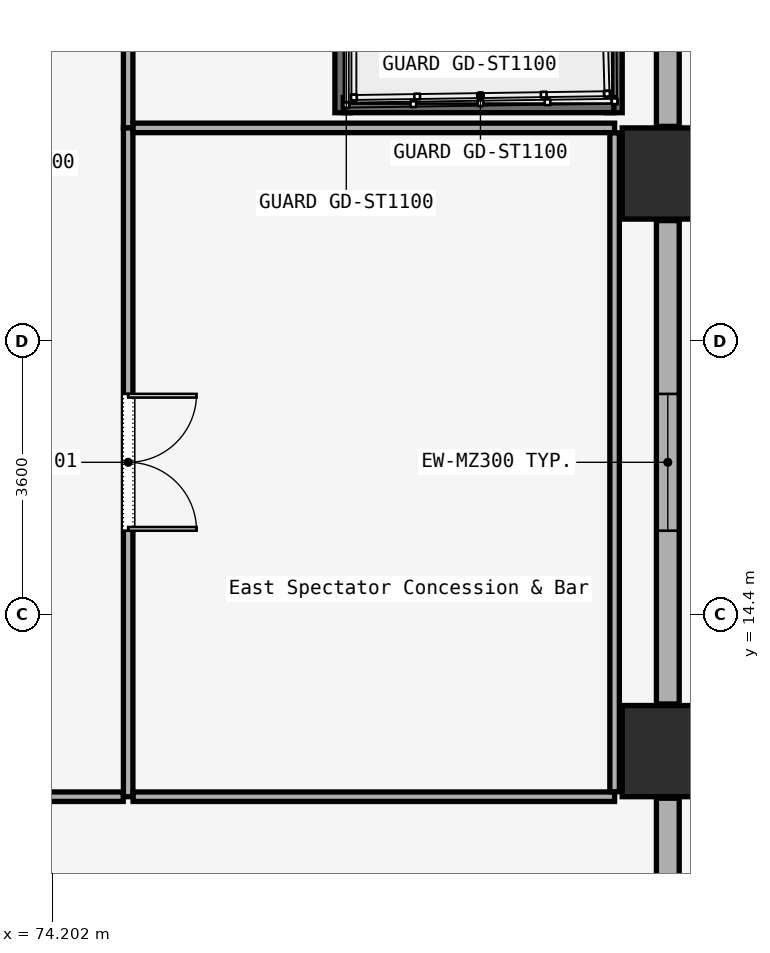
"""IFC4 building model, lengths in metres.
Left out: names, types, materials, properties, quantities, classifications, styles, units other than length and angle.
Written with IfcOpenShell. Run it as: python <this file> out.ifc"""

import sys

from ifc_helpers import new_model, si_unit, direction, frame, frame_2d, origin, origin_2d, place, context, subcontext, project, spatial, rectangle, extrude, element, fill, save


model = new_model("IFC4")
c1 = context("Model", 3, precision=1e-05, world=origin(), true_north=direction((0.0, 1.0)))
c2 = subcontext(c1, "Body", "Model", "MODEL_VIEW")
j1 = project(units=[si_unit("LENGTHUNIT", "METRE"), si_unit("PLANEANGLEUNIT", "RADIAN")], contexts=[c1])
p1 = place(None, origin())
s1 = spatial("IfcSite", under=j1, at=p1, CompositionType="ELEMENT")
p2 = place(p1, origin())
s2 = spatial("IfcBuilding", under=s1, at=p2, CompositionType="ELEMENT")
p3 = place(p2, frame((0.0, 0.0, 6.0)))
s3 = spatial("IfcBuildingStorey", under=s2, at=p3, CompositionType="ELEMENT", Elevation=6.0)
for number, where, z_axis, x_axis in (
    (1, (82.3, 12.6, 0.0), (0.0, 0.0, 1.0), (1.0, 0.0, 0.0)),
    (2, (82.3, 20.2, 0.0), (0.0, 0.0, 1.0), (1.0, 0.0, 0.0)),
):
    element("IfcColumn", number, at=place(p3, frame(where, z_axis=z_axis, x_axis=x_axis)), inside=s3, PredefinedType="COLUMN", context=c2, shape_type="SweptSolid", body=[
        extrude(rectangle(XDim=1.2, YDim=1.2, at=origin_2d()), origin(), (0.0, 0.0, 1.0), 5.7),
    ])
p4 = place(p3, frame((82.3, 11.98, 0.0), z_axis=(0.0, 0.0, 1.0), x_axis=(0.0, -1.0, 0.0)))
e3 = element("IfcWall", 3, at=p4, inside=s3, PredefinedType="SOLIDWALL", context=c2, shape_type="SweptSolid", body=[
    extrude(rectangle(XDim=6.36, YDim=0.3, at=frame_2d((3.18, 0.0))), origin(), (0.0, 0.0, 1.0), 5.7),
])
p5 = place(p4, frame((2.28, 0.0, 1.0)))
e4 = element("IfcOpeningElement", 4, at=p5, cuts=e3, PredefinedType="OPENING", context=c2, shape_type="SweptSolid", body=[
    extrude(rectangle(XDim=1.8, YDim=2.2, at=frame_2d((0.9, 1.1))), frame((0.0, 0.15, 0.0), z_axis=(0.0, -1.0, 0.0), x_axis=(1.0, 0.0, 0.0)), (0.0, 0.0, 1.0), 0.3),
])
p6 = place(p3, frame((82.3, 19.58, 0.0), z_axis=(0.0, 0.0, 1.0), x_axis=(0.0, -1.0, 0.0)))
e5 = element("IfcWall", 5, at=p6, inside=s3, PredefinedType="SOLIDWALL", context=c2, shape_type="SweptSolid", body=[
    extrude(rectangle(XDim=6.36, YDim=0.3, at=frame_2d((3.18, 0.0))), origin(), (0.0, 0.0, 1.0), 5.7),
])
p7 = place(p6, frame((2.28, 0.0, 1.0)))
e6 = element("IfcOpeningElement", 6, at=p7, cuts=e5, PredefinedType="OPENING", context=c2, shape_type="SweptSolid", body=[
    extrude(rectangle(XDim=1.8, YDim=2.2, at=frame_2d((0.9, 1.1))), frame((0.0, 0.15, 0.0), z_axis=(0.0, -1.0, 0.0), x_axis=(1.0, 0.0, 0.0)), (0.0, 0.0, 1.0), 0.3),
])
p8 = place(p3, frame((82.3, 27.18, 0.0), z_axis=(0.0, 0.0, 1.0), x_axis=(0.0, -1.0, 0.0)))
e7 = element("IfcWall", 7, at=p8, inside=s3, PredefinedType="SOLIDWALL", context=c2, shape_type="SweptSolid", body=[
    extrude(rectangle(XDim=6.36, YDim=0.3, at=frame_2d((3.18, 0.0))), origin(), (0.0, 0.0, 1.0), 5.7),
])
p9 = place(p8, frame((2.28, 0.0, 1.0)))
e8 = element("IfcOpeningElement", 8, at=p9, cuts=e7, PredefinedType="OPENING", context=c2, shape_type="SweptSolid", body=[
    extrude(rectangle(XDim=1.8, YDim=2.2, at=frame_2d((0.9, 1.1))), frame((0.0, 0.15, 0.0), z_axis=(0.0, -1.0, 0.0), x_axis=(1.0, 0.0, 0.0)), (0.0, 0.0, 1.0), 0.3),
])
for number, where, z_axis, x_axis in (
    (9, (78.02, 28.95, 0.0), (0.0, 0.0, 1.0), (0.0, -1.0, 0.0)),
    (10, (81.6, 28.95, 0.0), (0.0, 0.0, 1.0), (0.0, -1.0, 0.0)),
):
    element("IfcWall", number, at=place(p3, frame(where, z_axis=z_axis, x_axis=x_axis)), inside=s3, PredefinedType="SOLIDWALL", context=c2, shape_type="SweptSolid", body=[
        extrude(rectangle(XDim=7.95, YDim=0.2, at=frame_2d((3.975, 0.0))), origin(), (0.0, 0.0, 1.0), 6.0),
    ])
p10 = place(p3, frame((78.03, 21.1, 0.0), z_axis=(0.0, 0.0, 1.0), x_axis=(1.0, 0.0, 0.0)))
e11 = element("IfcWall", 11, at=p10, inside=s3, PredefinedType="SOLIDWALL", context=c2, shape_type="SweptSolid", body=[
    extrude(rectangle(XDim=3.56, YDim=0.2, at=frame_2d((1.78, 0.0))), origin(), (0.0, 0.0, 1.0), 6.0),
])
p11 = place(p3, frame((75.2, 43.585, 0.0), z_axis=(0.0, 0.0, 1.0), x_axis=(0.0, -1.0, 0.0)))
e12 = element("IfcWall", 12, at=p11, inside=s3, PredefinedType="PARTITIONING", context=c2, shape_type="SweptSolid", body=[
    extrude(rectangle(XDim=22.785, YDim=0.125, at=frame_2d((11.393, 0.0))), origin(), (0.0, 0.0, 1.0), 4.819),
])
p12 = place(p3, frame((75.2, 20.8, 0.0), z_axis=(0.0, 0.0, 1.0), x_axis=(0.0, -1.0, 0.0)))
e13 = element("IfcWall", 13, at=p12, inside=s3, PredefinedType="PARTITIONING", context=c2, shape_type="SweptSolid", body=[
    extrude(rectangle(XDim=8.8, YDim=0.125, at=frame_2d((4.4, 0.0))), origin(), (0.0, 0.0, 1.0), 4.819),
])
p13 = place(p12, frame((3.5, 0.0, 0.0)))
e14 = element("IfcOpeningElement", 14, at=p13, cuts=e13, PredefinedType="OPENING", context=c2, shape_type="SweptSolid", body=[
    extrude(rectangle(XDim=1.8, YDim=2.3, at=frame_2d((0.9, 1.15))), frame((0.0, 0.062, 0.0), z_axis=(0.0, -1.0, 0.0), x_axis=(1.0, 0.0, 0.0)), (0.0, 0.0, 1.0), 0.125),
])
p14 = place(p3, frame((75.135, 12.0, 0.0), z_axis=(0.0, 0.0, 1.0), x_axis=(-1.0, 0.0, 0.0)))
e15 = element("IfcWall", 15, at=p14, inside=s3, PredefinedType="PARTITIONING", context=c2, shape_type="SweptSolid", body=[
    extrude(rectangle(XDim=5.635, YDim=0.125, at=frame_2d((2.817, 0.0))), origin(), (0.0, 0.0, 1.0), 4.819),
])
for number, where, z_axis, x_axis in (
    (16, (81.6, 12.0, 0.0), (0.0, 0.0, 1.0), (-1.0, 0.0, 0.0)),
    (17, (75.265, 20.8, 0.0), (0.0, 0.0, 1.0), (1.0, 0.0, 0.0)),
):
    element("IfcWall", number, at=place(p3, frame(where, z_axis=z_axis, x_axis=x_axis)), inside=s3, PredefinedType="PARTITIONING", context=c2, shape_type="SweptSolid", body=[
        extrude(rectangle(XDim=6.335, YDim=0.125, at=frame_2d((3.167, 0.0))), origin(), (0.0, 0.0, 1.0), 4.819),
    ])
p15 = place(p3, frame((81.6, 20.735, 0.0), z_axis=(0.0, 0.0, 1.0), x_axis=(0.0, -1.0, 0.0)))
e18 = element("IfcWall", 18, at=p15, inside=s3, PredefinedType="PARTITIONING", context=c2, shape_type="SweptSolid", body=[
    extrude(rectangle(XDim=8.67, YDim=0.125, at=frame_2d((4.335, 0.0))), origin(), (0.0, 0.0, 1.0), 4.819),
])
p16 = place(p7, origin())
e19 = element("IfcWindow", 19, at=p16, inside=s3, PartitioningType="SINGLE_PANEL", PredefinedType="WINDOW", context=c2, shape_type="SweptSolid", body=[
    extrude(rectangle(XDim=1.8, YDim=2.2, at=frame_2d((0.9, 1.1))), frame((0.0, 0.03, 0.0), z_axis=(0.0, -1.0, 0.0), x_axis=(1.0, 0.0, 0.0)), (0.0, 0.0, 1.0), 0.06),
])
fill(e6, e19)
p17 = place(p13, origin())
e20 = element("IfcDoor", 20, at=p17, inside=s3, OperationType="SINGLE_SWING_LEFT", PredefinedType="DOOR", context=c2, shape_type="SweptSolid", body=[
    extrude(rectangle(XDim=1.8, YDim=2.3, at=frame_2d((0.9, 1.15))), frame((0.0, 0.025, 0.0), z_axis=(0.0, -1.0, 0.0), x_axis=(1.0, 0.0, 0.0)), (0.0, 0.0, 1.0), 0.05),
])
fill(e14, e20)
save(model, sys.argv[1])
